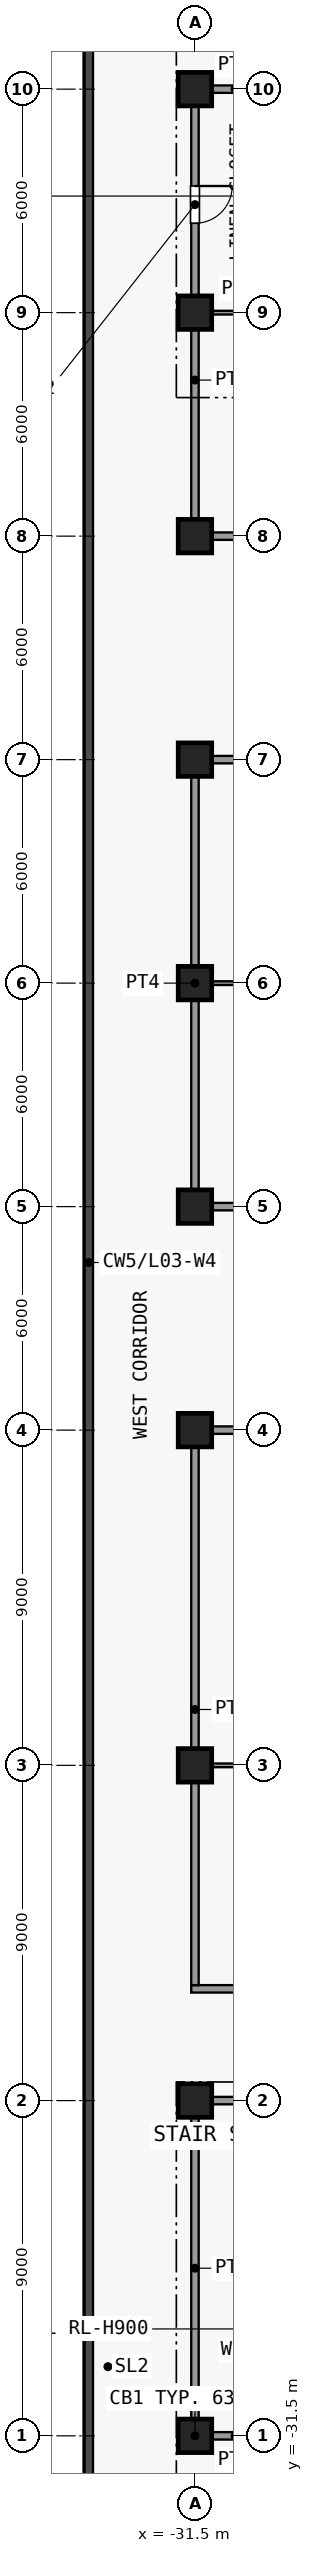
"""IFC4 building model, lengths in metres.
Left out: names, types, materials, properties, quantities, classifications, styles, units other than length and angle.
Written with IfcOpenShell. Run it as: python <this file> out.ifc"""

import sys

from ifc_helpers import new_model, si_unit, direction, frame, frame_2d, origin, origin_2d, place, context, subcontext, project, spatial, rectangle, extrude, element, fill, save


model = new_model("IFC4")
c1 = context("Model", 3, precision=1e-05, world=origin(), true_north=direction((0.0, 1.0)))
c2 = subcontext(c1, "Body", "Model", "MODEL_VIEW")
j1 = project(units=[si_unit("LENGTHUNIT", "METRE"), si_unit("PLANEANGLEUNIT", "RADIAN")], contexts=[c1])
p1 = place(None, origin())
s1 = spatial("IfcSite", under=j1, at=p1, CompositionType="ELEMENT")
p2 = place(p1, origin())
s2 = spatial("IfcBuilding", under=s1, at=p2, CompositionType="ELEMENT")
p3 = place(p2, frame((0.0, 0.0, 18.5)))
s3 = spatial("IfcBuildingStorey", under=s2, at=p3, CompositionType="ELEMENT", Elevation=18.5)
for number, where, z_axis, x_axis in (
    (1, (-31.5, -31.5, 0.0), (0.0, 0.0, 1.0), (1.0, 0.0, 0.0)),
    (2, (-31.5, -22.5, 0.0), (0.0, 0.0, 1.0), (1.0, 0.0, 0.0)),
    (3, (-31.5, -13.5, 0.0), (0.0, 0.0, 1.0), (1.0, 0.0, 0.0)),
    (4, (-31.5, -4.5, 0.0), (0.0, 0.0, 1.0), (1.0, 0.0, 0.0)),
    (5, (-31.5, 1.5, 0.0), (0.0, 0.0, 1.0), (1.0, 0.0, 0.0)),
    (6, (-31.5, 7.5, 0.0), (0.0, 0.0, 1.0), (1.0, 0.0, 0.0)),
    (7, (-31.5, 13.5, 0.0), (0.0, 0.0, 1.0), (1.0, 0.0, 0.0)),
    (8, (-31.5, 19.5, 0.0), (0.0, 0.0, 1.0), (1.0, 0.0, 0.0)),
    (9, (-31.5, 25.5, 0.0), (0.0, 0.0, 1.0), (1.0, 0.0, 0.0)),
    (10, (-31.5, 31.5, 0.0), (0.0, 0.0, 1.0), (1.0, 0.0, 0.0)),
):
    element("IfcColumn", number, at=place(p3, frame(where, z_axis=z_axis, x_axis=x_axis)), inside=s3, PredefinedType="COLUMN", context=c2, shape_type="SweptSolid", body=[
        extrude(rectangle(XDim=0.9, YDim=0.9, at=origin_2d()), origin(), (0.0, 0.0, 1.0), 5.0),
    ])
p4 = place(p3, frame((-31.6, -31.5, 0.0), z_axis=(0.0, 0.0, 1.0), x_axis=(1.0, 0.0, 0.0)))
e11 = element("IfcWall", 11, at=p4, inside=s3, PredefinedType="PARTITIONING", context=c2, shape_type="SweptSolid", body=[
    extrude(rectangle(XDim=2.35, YDim=0.2, at=frame_2d((1.175, 0.0))), origin(), (0.0, 0.0, 1.0), 4.65),
])
p5 = place(p3, frame((-31.6, -22.5, 0.0), z_axis=(0.0, 0.0, 1.0), x_axis=(1.0, 0.0, 0.0)))
e12 = element("IfcWall", 12, at=p5, inside=s3, PredefinedType="PARTITIONING", context=c2, shape_type="SweptSolid", body=[
    extrude(rectangle(XDim=14.2, YDim=0.2, at=frame_2d((7.1, 0.0))), origin(), (0.0, 0.0, 1.0), 4.65),
])
p6 = place(p5, frame((6.6, 0.0, 0.0)))
e13 = element("IfcOpeningElement", 13, at=p6, cuts=e12, PredefinedType="OPENING", context=c2, shape_type="SweptSolid", body=[
    extrude(rectangle(XDim=1.0, YDim=2.1, at=frame_2d((0.5, 1.05))), frame((0.0, 0.11, 0.0), z_axis=(0.0, -1.0, 0.0), x_axis=(1.0, 0.0, 0.0)), (0.0, 0.0, 1.0), 0.22),
])
p7 = place(p3, frame((-31.6, -19.5, 0.0), z_axis=(0.0, 0.0, 1.0), x_axis=(1.0, 0.0, 0.0)))
e14 = element("IfcWall", 14, at=p7, inside=s3, PredefinedType="PARTITIONING", context=c2, shape_type="SweptSolid", body=[
    extrude(rectangle(XDim=18.1, YDim=0.2, at=frame_2d((9.05, 0.0))), origin(), (0.0, 0.0, 1.0), 4.65),
])
p8 = place(p7, frame((3.2, 0.0, 0.0)))
e15 = element("IfcOpeningElement", 15, at=p8, cuts=e14, PredefinedType="OPENING", context=c2, shape_type="SweptSolid", body=[
    extrude(rectangle(XDim=1.0, YDim=2.1, at=frame_2d((0.5, 1.05))), frame((0.0, 0.11, 0.0), z_axis=(0.0, -1.0, 0.0), x_axis=(1.0, 0.0, 0.0)), (0.0, 0.0, 1.0), 0.22),
])
p9 = place(p7, frame((14.0, 0.0, 0.0)))
e16 = element("IfcOpeningElement", 16, at=p9, cuts=e14, PredefinedType="OPENING", context=c2, shape_type="SweptSolid", body=[
    extrude(rectangle(XDim=1.0, YDim=2.1, at=frame_2d((0.5, 1.05))), frame((0.0, 0.11, 0.0), z_axis=(0.0, -1.0, 0.0), x_axis=(1.0, 0.0, 0.0)), (0.0, 0.0, 1.0), 0.22),
])
p10 = place(p3, frame((-31.4, -13.5, 0.0), z_axis=(0.0, 0.0, 1.0), x_axis=(1.0, 0.0, 0.0)))
e17 = element("IfcWall", 17, at=p10, inside=s3, PredefinedType="PARTITIONING", context=c2, shape_type="SweptSolid", body=[
    extrude(rectangle(XDim=17.9, YDim=0.1, at=frame_2d((8.95, 0.0))), origin(), (0.0, 0.0, 1.0), 4.65),
])
p11 = place(p3, frame((-31.6, -4.5, 0.0), z_axis=(0.0, 0.0, 1.0), x_axis=(1.0, 0.0, 0.0)))
e18 = element("IfcWall", 18, at=p11, inside=s3, PredefinedType="PARTITIONING", context=c2, shape_type="SweptSolid", body=[
    extrude(rectangle(XDim=18.2, YDim=0.2, at=frame_2d((9.1, 0.0))), origin(), (0.0, 0.0, 1.0), 4.65),
])
p12 = place(p11, frame((3.2, 0.0, 0.0)))
e19 = element("IfcOpeningElement", 19, at=p12, cuts=e18, PredefinedType="OPENING", context=c2, shape_type="SweptSolid", body=[
    extrude(rectangle(XDim=1.0, YDim=2.1, at=frame_2d((0.5, 1.05))), frame((0.0, 0.11, 0.0), z_axis=(0.0, -1.0, 0.0), x_axis=(1.0, 0.0, 0.0)), (0.0, 0.0, 1.0), 0.22),
])
p13 = place(p11, frame((13.2, 0.0, 0.0)))
e20 = element("IfcOpeningElement", 20, at=p13, cuts=e18, PredefinedType="OPENING", context=c2, shape_type="SweptSolid", body=[
    extrude(rectangle(XDim=1.0, YDim=2.1, at=frame_2d((0.5, 1.05))), frame((0.0, 0.11, 0.0), z_axis=(0.0, -1.0, 0.0), x_axis=(1.0, 0.0, 0.0)), (0.0, 0.0, 1.0), 0.22),
])
p14 = place(p3, frame((-31.6, 1.5, 0.0), z_axis=(0.0, 0.0, 1.0), x_axis=(1.0, 0.0, 0.0)))
e21 = element("IfcWall", 21, at=p14, inside=s3, PredefinedType="PARTITIONING", context=c2, shape_type="SweptSolid", body=[
    extrude(rectangle(XDim=11.3, YDim=0.2, at=frame_2d((5.65, 0.0))), origin(), (0.0, 0.0, 1.0), 4.65),
])
p15 = place(p14, frame((5.1, 0.0, 0.0)))
e22 = element("IfcOpeningElement", 22, at=p15, cuts=e21, PredefinedType="OPENING", context=c2, shape_type="SweptSolid", body=[
    extrude(rectangle(XDim=1.0, YDim=2.1, at=frame_2d((0.5, 1.05))), frame((0.0, 0.11, 0.0), z_axis=(0.0, -1.0, 0.0), x_axis=(1.0, 0.0, 0.0)), (0.0, 0.0, 1.0), 0.22),
])
p16 = place(p3, frame((-31.4, 7.5, 0.0), z_axis=(0.0, 0.0, 1.0), x_axis=(1.0, 0.0, 0.0)))
e23 = element("IfcWall", 23, at=p16, inside=s3, PredefinedType="PARTITIONING", context=c2, shape_type="SweptSolid", body=[
    extrude(rectangle(XDim=10.9, YDim=0.1, at=frame_2d((5.45, 0.0))), origin(), (0.0, 0.0, 1.0), 4.65),
])
p17 = place(p3, frame((-31.6, 13.5, 0.0), z_axis=(0.0, 0.0, 1.0), x_axis=(1.0, 0.0, 0.0)))
e24 = element("IfcWall", 24, at=p17, inside=s3, PredefinedType="PARTITIONING", context=c2, shape_type="SweptSolid", body=[
    extrude(rectangle(XDim=11.3, YDim=0.2, at=frame_2d((5.65, 0.0))), origin(), (0.0, 0.0, 1.0), 4.65),
])
p18 = place(p17, frame((5.1, 0.0, 0.0)))
e25 = element("IfcOpeningElement", 25, at=p18, cuts=e24, PredefinedType="OPENING", context=c2, shape_type="SweptSolid", body=[
    extrude(rectangle(XDim=1.0, YDim=2.1, at=frame_2d((0.5, 1.05))), frame((0.0, 0.11, 0.0), z_axis=(0.0, -1.0, 0.0), x_axis=(1.0, 0.0, 0.0)), (0.0, 0.0, 1.0), 0.22),
])
p19 = place(p3, frame((-31.6, 19.5, 0.0), z_axis=(0.0, 0.0, 1.0), x_axis=(1.0, 0.0, 0.0)))
e26 = element("IfcWall", 26, at=p19, inside=s3, PredefinedType="PARTITIONING", context=c2, shape_type="SweptSolid", body=[
    extrude(rectangle(XDim=60.1, YDim=0.2, at=frame_2d((30.05, 0.0))), origin(), (0.0, 0.0, 1.0), 4.65),
])
p20 = place(p19, frame((6.8, 0.0, 0.0)))
e27 = element("IfcOpeningElement", 27, at=p20, cuts=e26, PredefinedType="OPENING", context=c2, shape_type="SweptSolid", body=[
    extrude(rectangle(XDim=1.0, YDim=2.1, at=frame_2d((0.5, 1.05))), frame((0.0, 0.11, 0.0), z_axis=(0.0, -1.0, 0.0), x_axis=(1.0, 0.0, 0.0)), (0.0, 0.0, 1.0), 0.22),
])
p21 = place(p19, frame((18.3, 0.0, 0.0)))
e28 = element("IfcOpeningElement", 28, at=p21, cuts=e26, PredefinedType="OPENING", context=c2, shape_type="SweptSolid", body=[
    extrude(rectangle(XDim=1.0, YDim=2.1, at=frame_2d((0.5, 1.05))), frame((0.0, 0.11, 0.0), z_axis=(0.0, -1.0, 0.0), x_axis=(1.0, 0.0, 0.0)), (0.0, 0.0, 1.0), 0.22),
])
p22 = place(p19, frame((30.9, 0.0, 0.0)))
e29 = element("IfcOpeningElement", 29, at=p22, cuts=e26, PredefinedType="OPENING", context=c2, shape_type="SweptSolid", body=[
    extrude(rectangle(XDim=1.0, YDim=2.1, at=frame_2d((0.5, 1.05))), frame((0.0, 0.11, 0.0), z_axis=(0.0, -1.0, 0.0), x_axis=(1.0, 0.0, 0.0)), (0.0, 0.0, 1.0), 0.22),
])
p23 = place(p19, frame((40.0, 0.0, 0.0)))
e30 = element("IfcOpeningElement", 30, at=p23, cuts=e26, PredefinedType="OPENING", context=c2, shape_type="SweptSolid", body=[
    extrude(rectangle(XDim=1.0, YDim=2.1, at=frame_2d((0.5, 1.05))), frame((0.0, 0.11, 0.0), z_axis=(0.0, -1.0, 0.0), x_axis=(1.0, 0.0, 0.0)), (0.0, 0.0, 1.0), 0.22),
])
p24 = place(p19, frame((55.0, 0.0, 0.0)))
e31 = element("IfcOpeningElement", 31, at=p24, cuts=e26, PredefinedType="OPENING", context=c2, shape_type="SweptSolid", body=[
    extrude(rectangle(XDim=1.0, YDim=2.1, at=frame_2d((0.5, 1.05))), frame((0.0, 0.11, 0.0), z_axis=(0.0, -1.0, 0.0), x_axis=(1.0, 0.0, 0.0)), (0.0, 0.0, 1.0), 0.22),
])
p25 = place(p3, frame((-31.4, 25.5, 0.0), z_axis=(0.0, 0.0, 1.0), x_axis=(1.0, 0.0, 0.0)))
e32 = element("IfcWall", 32, at=p25, inside=s3, PredefinedType="PARTITIONING", context=c2, shape_type="SweptSolid", body=[
    extrude(rectangle(XDim=2.15, YDim=0.1, at=frame_2d((1.075, 0.0))), origin(), (0.0, 0.0, 1.0), 4.65),
])
p26 = place(p3, frame((-31.6, 31.5, 0.0), z_axis=(0.0, 0.0, 1.0), x_axis=(1.0, 0.0, 0.0)))
e33 = element("IfcWall", 33, at=p26, inside=s3, PredefinedType="PARTITIONING", context=c2, shape_type="SweptSolid", body=[
    extrude(rectangle(XDim=2.35, YDim=0.2, at=frame_2d((1.175, 0.0))), origin(), (0.0, 0.0, 1.0), 4.65),
])
p27 = place(p3, frame((-31.5, -31.4, 0.0), z_axis=(0.0, 0.0, 1.0), x_axis=(0.0, 1.0, 0.0)))
e34 = element("IfcWall", 34, at=p27, inside=s3, PredefinedType="PARTITIONING", context=c2, shape_type="SweptSolid", body=[
    extrude(rectangle(XDim=8.8, YDim=0.2, at=frame_2d((4.4, 0.0))), origin(), (0.0, 0.0, 1.0), 4.65),
])
p28 = place(p3, frame((-31.5, -19.4, 0.0), z_axis=(0.0, 0.0, 1.0), x_axis=(0.0, 1.0, 0.0)))
e35 = element("IfcWall", 35, at=p28, inside=s3, PredefinedType="PARTITIONING", context=c2, shape_type="SweptSolid", body=[
    extrude(rectangle(XDim=14.8, YDim=0.2, at=frame_2d((7.4, 0.0))), origin(), (0.0, 0.0, 1.0), 4.65),
])
p29 = place(p3, frame((-31.5, 1.6, 0.0), z_axis=(0.0, 0.0, 1.0), x_axis=(0.0, 1.0, 0.0)))
e36 = element("IfcWall", 36, at=p29, inside=s3, PredefinedType="PARTITIONING", context=c2, shape_type="SweptSolid", body=[
    extrude(rectangle(XDim=11.8, YDim=0.2, at=frame_2d((5.9, 0.0))), origin(), (0.0, 0.0, 1.0), 4.65),
])
p30 = place(p3, frame((-31.5, 19.6, 0.0), z_axis=(0.0, 0.0, 1.0), x_axis=(0.0, 1.0, 0.0)))
e37 = element("IfcWall", 37, at=p30, inside=s3, PredefinedType="PARTITIONING", context=c2, shape_type="SweptSolid", body=[
    extrude(rectangle(XDim=11.8, YDim=0.2, at=frame_2d((5.9, 0.0))), origin(), (0.0, 0.0, 1.0), 4.65),
])
p31 = place(p30, frame((8.3, 0.0, 0.0)))
e38 = element("IfcOpeningElement", 38, at=p31, cuts=e37, PredefinedType="OPENING", context=c2, shape_type="SweptSolid", body=[
    extrude(rectangle(XDim=1.0, YDim=2.1, at=frame_2d((0.5, 1.05))), frame((0.0, 0.11, 0.0), z_axis=(0.0, -1.0, 0.0), x_axis=(1.0, 0.0, 0.0)), (0.0, 0.0, 1.0), 0.22),
])
p32 = place(p31, origin())
e39 = element("IfcDoor", 39, at=p32, inside=s3, OperationType="SINGLE_SWING_RIGHT", PredefinedType="DOOR", context=c2, shape_type="SweptSolid", body=[
    extrude(rectangle(XDim=1.0, YDim=2.1, at=frame_2d((0.5, 1.05))), frame((0.0, 0.025, 0.0), z_axis=(0.0, -1.0, 0.0), x_axis=(1.0, 0.0, 0.0)), (0.0, 0.0, 1.0), 0.05),
])
fill(e38, e39)
save(model, sys.argv[1])
